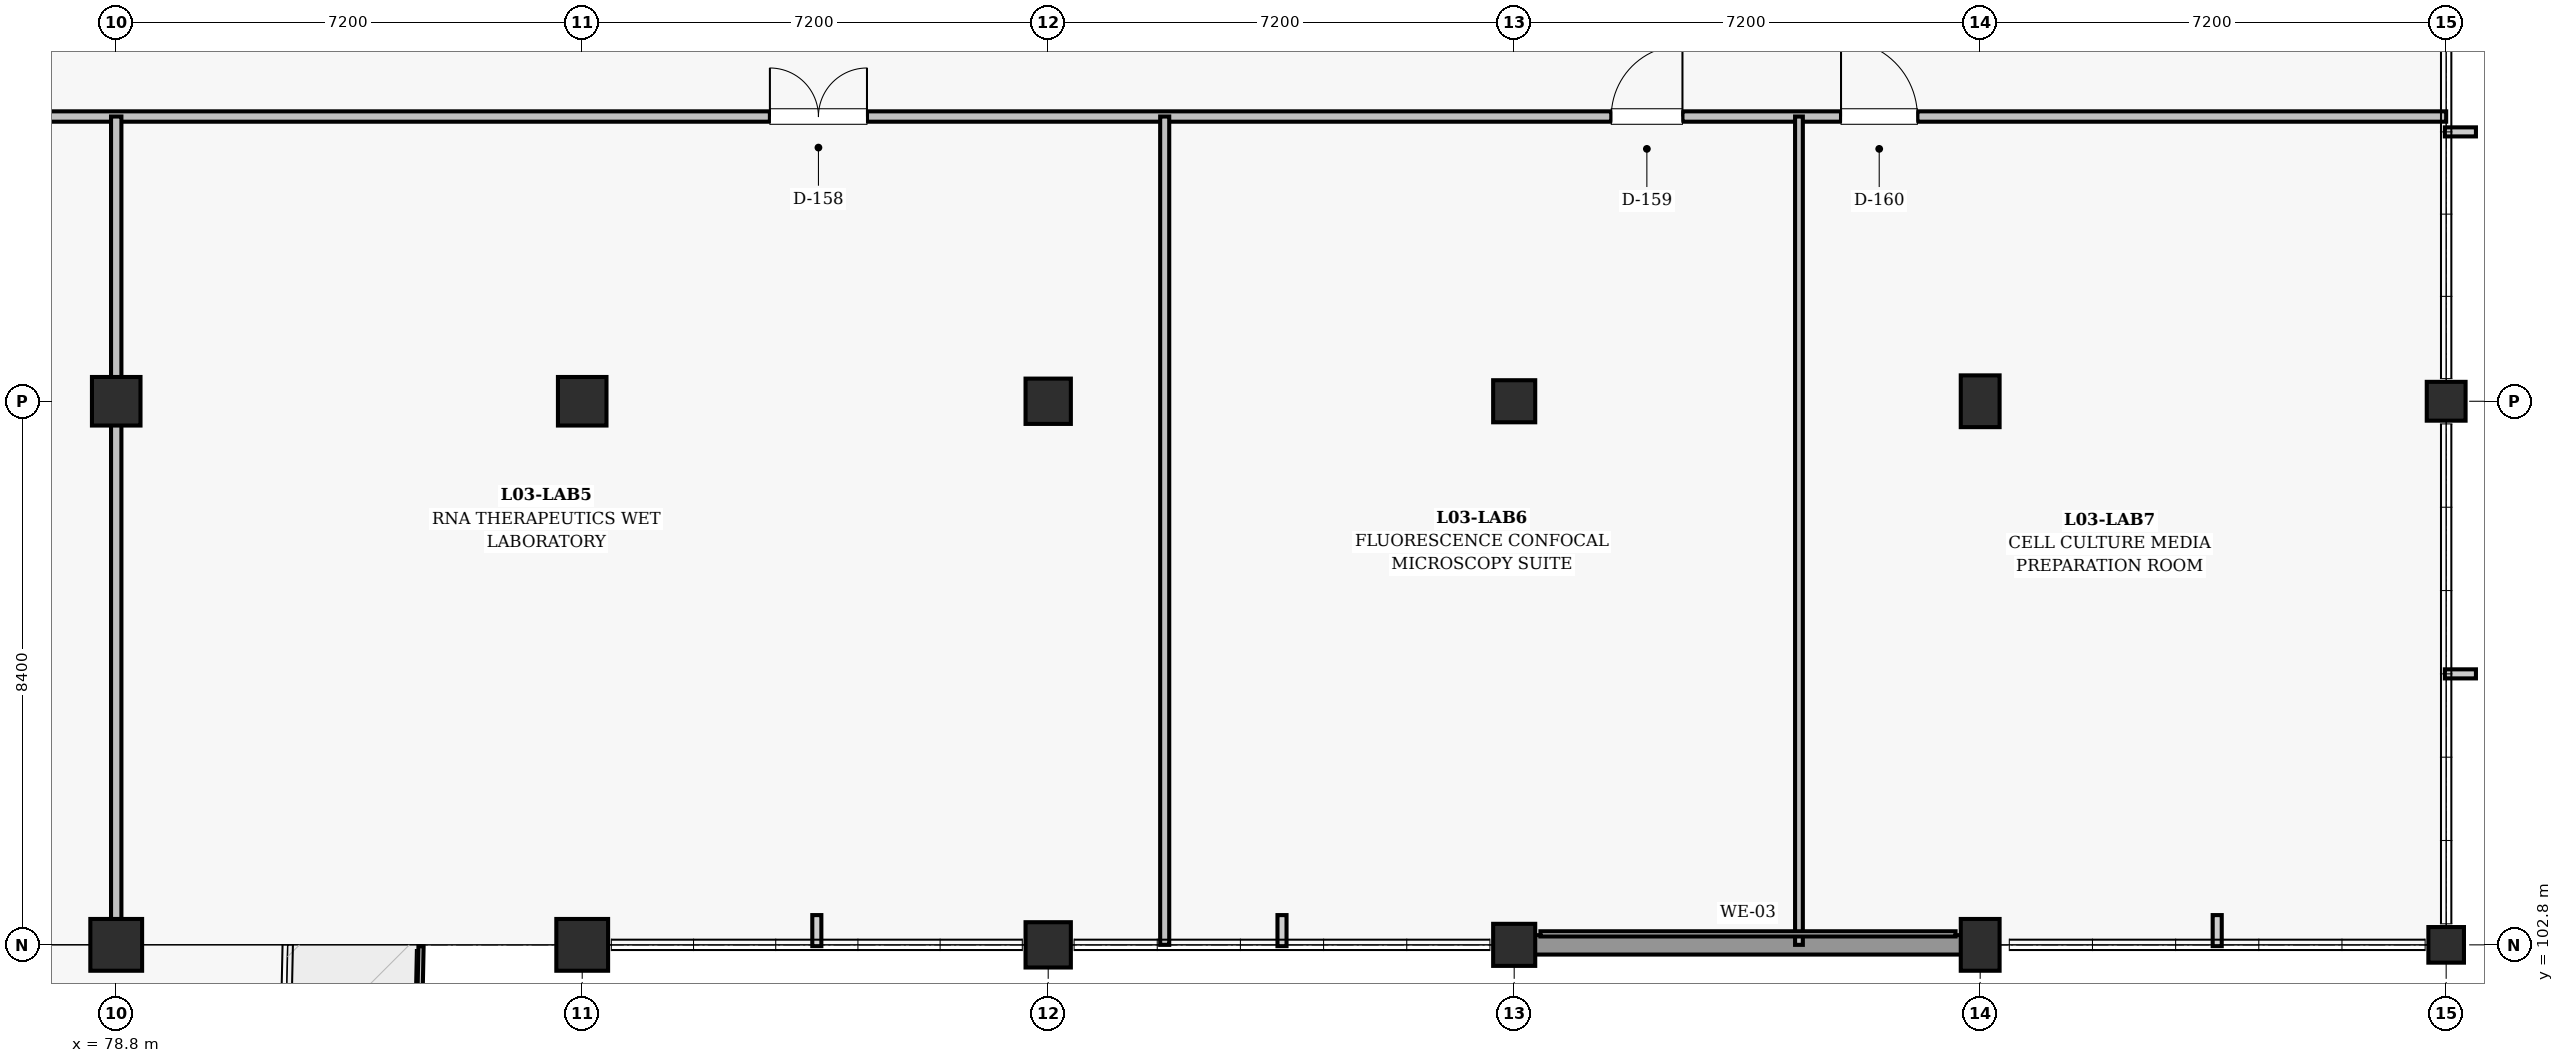
"""IFC4 building model, lengths in metres.
Left out: names, types, materials, properties, quantities, classifications, styles, units other than length and angle.
Written with IfcOpenShell. Run it as: python <this file> out.ifc"""

import sys

from ifc_helpers import new_model, si_unit, direction, frame, frame_2d, origin, origin_2d, place, context, subcontext, project, spatial, rectangle, extrude, element, fill, save


model = new_model("IFC4")
c1 = context("Model", 3, precision=1e-05, world=origin(), true_north=direction((0.0, 1.0)))
c2 = subcontext(c1, "Body", "Model", "MODEL_VIEW")
j1 = project(units=[si_unit("LENGTHUNIT", "METRE"), si_unit("PLANEANGLEUNIT", "RADIAN")], contexts=[c1])
p1 = place(None, origin())
s1 = spatial("IfcSite", under=j1, at=p1, CompositionType="ELEMENT")
p2 = place(p1, origin())
s2 = spatial("IfcBuilding", under=s1, at=p2, CompositionType="ELEMENT")
p3 = place(p2, frame((0.0, 0.0, 14.4)))
s3 = spatial("IfcBuildingStorey", under=s2, at=p3, CompositionType="ELEMENT", Elevation=14.4)
p4 = place(p3, frame((78.8, 102.8, 0.0), z_axis=(0.0, 0.0, 1.0), x_axis=(1.0, 0.0, 0.0)))
e1 = element("IfcColumn", 1, at=p4, inside=s3, PredefinedType="COLUMN", context=c2, shape_type="SweptSolid", body=[
    extrude(rectangle(XDim=0.8, YDim=0.8, at=origin_2d()), origin(), (0.0, 0.0, 1.0), 4.5),
])
p5 = place(p3, frame((78.8, 111.2, 0.0), z_axis=(0.0, 0.0, 1.0), x_axis=(1.0, 0.0, 0.0)))
e2 = element("IfcColumn", 2, at=p5, inside=s3, PredefinedType="COLUMN", context=c2, shape_type="SweptSolid", body=[
    extrude(rectangle(XDim=0.75, YDim=0.75, at=origin_2d()), origin(), (0.0, 0.0, 1.0), 4.5),
])
p6 = place(p3, frame((86.0, 102.8, 0.0), z_axis=(0.0, 0.0, 1.0), x_axis=(1.0, 0.0, 0.0)))
e3 = element("IfcColumn", 3, at=p6, inside=s3, PredefinedType="COLUMN", context=c2, shape_type="SweptSolid", body=[
    extrude(rectangle(XDim=0.8, YDim=0.8, at=origin_2d()), origin(), (0.0, 0.0, 1.0), 4.5),
])
p7 = place(p3, frame((86.0, 111.2, 0.0), z_axis=(0.0, 0.0, 1.0), x_axis=(1.0, 0.0, 0.0)))
e4 = element("IfcColumn", 4, at=p7, inside=s3, PredefinedType="COLUMN", context=c2, shape_type="SweptSolid", body=[
    extrude(rectangle(XDim=0.75, YDim=0.75, at=origin_2d()), origin(), (0.0, 0.0, 1.0), 4.5),
])
for number, where, z_axis, x_axis in (
    (5, (93.2, 102.8, 0.0), (0.0, 0.0, 1.0), (1.0, 0.0, 0.0)),
    (6, (93.2, 111.2, 0.0), (0.0, 0.0, 1.0), (1.0, 0.0, 0.0)),
):
    element("IfcColumn", number, at=place(p3, frame(where, z_axis=z_axis, x_axis=x_axis)), inside=s3, PredefinedType="COLUMN", context=c2, shape_type="SweptSolid", body=[
        extrude(rectangle(XDim=0.7, YDim=0.7, at=origin_2d()), origin(), (0.0, 0.0, 1.0), 4.5),
    ])
for number, where, z_axis, x_axis in (
    (7, (100.4, 102.8, 0.0), (0.0, 0.0, 1.0), (1.0, 0.0, 0.0)),
    (8, (100.4, 111.2, 0.0), (0.0, 0.0, 1.0), (1.0, 0.0, 0.0)),
):
    element("IfcColumn", number, at=place(p3, frame(where, z_axis=z_axis, x_axis=x_axis)), inside=s3, PredefinedType="COLUMN", context=c2, shape_type="SweptSolid", body=[
        extrude(rectangle(XDim=0.65, YDim=0.65, at=origin_2d()), origin(), (0.0, 0.0, 1.0), 4.5),
    ])
for number, where, z_axis, x_axis in (
    (9, (107.6, 102.8, 0.0), (0.0, 0.0, 1.0), (1.0, 0.0, 0.0)),
    (10, (107.6, 111.2, 0.0), (0.0, 0.0, 1.0), (1.0, 0.0, 0.0)),
):
    element("IfcColumn", number, at=place(p3, frame(where, z_axis=z_axis, x_axis=x_axis)), inside=s3, PredefinedType="COLUMN", context=c2, shape_type="SweptSolid", body=[
        extrude(rectangle(XDim=0.6, YDim=0.8, at=origin_2d()), origin(), (0.0, 0.0, 1.0), 4.5),
    ])
p8 = place(p3, frame((114.8, 102.8, 0.0), z_axis=(0.0, 0.0, 1.0), x_axis=(1.0, 0.0, 0.0)))
e11 = element("IfcColumn", 11, at=p8, inside=s3, PredefinedType="COLUMN", context=c2, shape_type="SweptSolid", body=[
    extrude(rectangle(XDim=0.55, YDim=0.55, at=origin_2d()), origin(), (0.0, 0.0, 1.0), 4.5),
])
p9 = place(p3, frame((114.8, 111.2, 0.0), z_axis=(0.0, 0.0, 1.0), x_axis=(1.0, 0.0, 0.0)))
e12 = element("IfcColumn", 12, at=p9, inside=s3, PredefinedType="COLUMN", context=c2, shape_type="SweptSolid", body=[
    extrude(rectangle(XDim=0.6, YDim=0.6, at=origin_2d()), origin(), (0.0, 0.0, 1.0), 4.5),
])
p10 = place(p3, frame((100.705, 102.8, 0.0), z_axis=(0.0, 0.0, 1.0), x_axis=(1.0, 0.0, 0.0)))
e13 = element("IfcWall", 13, at=p10, inside=s3, PredefinedType="SOLIDWALL", context=c2, shape_type="SweptSolid", body=[
    extrude(rectangle(XDim=6.615, YDim=0.3, at=frame_2d((3.308, 0.0))), origin(), (0.0, 0.0, 1.0), 2.955),
])
p11 = place(p3, frame((14.0, 115.6, 0.0), z_axis=(0.0, 0.0, 1.0), x_axis=(1.0, 0.0, 0.0)))
e14 = element("IfcWall", 14, at=p11, inside=s3, PredefinedType="PARTITIONING", context=c2, shape_type="SweptSolid", body=[
    extrude(rectangle(XDim=100.8, YDim=0.16, at=frame_2d((50.4, 0.0))), origin(), (0.0, 0.0, 1.0), 2.96),
])
p12 = place(p11, frame((29.9, 0.0, 0.0)))
e15 = element("IfcOpeningElement", 15, at=p12, cuts=e14, PredefinedType="OPENING", context=c2, shape_type="SweptSolid", body=[
    extrude(rectangle(XDim=1.0, YDim=2.15, at=frame_2d((0.5, 1.075))), frame((0.0, 0.09, 0.0), z_axis=(0.0, -1.0, 0.0), x_axis=(1.0, 0.0, 0.0)), (0.0, 0.0, 1.0), 0.18),
])
p13 = place(p11, frame((6.5, 0.0, 0.0)))
e16 = element("IfcOpeningElement", 16, at=p13, cuts=e14, PredefinedType="OPENING", context=c2, shape_type="SweptSolid", body=[
    extrude(rectangle(XDim=1.5, YDim=2.25, at=frame_2d((0.75, 1.125))), frame((0.0, 0.09, 0.0), z_axis=(0.0, -1.0, 0.0), x_axis=(1.0, 0.0, 0.0)), (0.0, 0.0, 1.0), 0.18),
])
p14 = place(p11, frame((22.9, 0.0, 0.0)))
e17 = element("IfcOpeningElement", 17, at=p14, cuts=e14, PredefinedType="OPENING", context=c2, shape_type="SweptSolid", body=[
    extrude(rectangle(XDim=1.5, YDim=2.25, at=frame_2d((0.75, 1.125))), frame((0.0, 0.09, 0.0), z_axis=(0.0, -1.0, 0.0), x_axis=(1.0, 0.0, 0.0)), (0.0, 0.0, 1.0), 0.18),
])
p15 = place(p11, frame((39.4, 0.0, 0.0)))
e18 = element("IfcOpeningElement", 18, at=p15, cuts=e14, PredefinedType="OPENING", context=c2, shape_type="SweptSolid", body=[
    extrude(rectangle(XDim=1.5, YDim=2.25, at=frame_2d((0.75, 1.125))), frame((0.0, 0.09, 0.0), z_axis=(0.0, -1.0, 0.0), x_axis=(1.0, 0.0, 0.0)), (0.0, 0.0, 1.0), 0.18),
])
p16 = place(p11, frame((55.8, 0.0, 0.0)))
e19 = element("IfcOpeningElement", 19, at=p16, cuts=e14, PredefinedType="OPENING", context=c2, shape_type="SweptSolid", body=[
    extrude(rectangle(XDim=1.5, YDim=2.25, at=frame_2d((0.75, 1.125))), frame((0.0, 0.09, 0.0), z_axis=(0.0, -1.0, 0.0), x_axis=(1.0, 0.0, 0.0)), (0.0, 0.0, 1.0), 0.18),
])
p17 = place(p11, frame((74.9, 0.0, 0.0)))
e20 = element("IfcOpeningElement", 20, at=p17, cuts=e14, PredefinedType="OPENING", context=c2, shape_type="SweptSolid", body=[
    extrude(rectangle(XDim=1.5, YDim=2.25, at=frame_2d((0.75, 1.125))), frame((0.0, 0.09, 0.0), z_axis=(0.0, -1.0, 0.0), x_axis=(1.0, 0.0, 0.0)), (0.0, 0.0, 1.0), 0.18),
])
p18 = place(p11, frame((87.9, 0.0, 0.0)))
e21 = element("IfcOpeningElement", 21, at=p18, cuts=e14, PredefinedType="OPENING", context=c2, shape_type="SweptSolid", body=[
    extrude(rectangle(XDim=1.1, YDim=2.15, at=frame_2d((0.55, 1.075))), frame((0.0, 0.09, 0.0), z_axis=(0.0, -1.0, 0.0), x_axis=(1.0, 0.0, 0.0)), (0.0, 0.0, 1.0), 0.18),
])
p19 = place(p11, frame((91.45, 0.0, 0.0)))
e22 = element("IfcOpeningElement", 22, at=p19, cuts=e14, PredefinedType="OPENING", context=c2, shape_type="SweptSolid", body=[
    extrude(rectangle(XDim=1.18, YDim=2.2, at=frame_2d((0.59, 1.1))), frame((0.0, 0.09, 0.0), z_axis=(0.0, -1.0, 0.0), x_axis=(1.0, 0.0, 0.0)), (0.0, 0.0, 1.0), 0.18),
])
p20 = place(p3, frame((78.8, 102.8, 0.0), z_axis=(0.0, 0.0, 1.0), x_axis=(0.0, 1.0, 0.0)))
e23 = element("IfcWall", 23, at=p20, inside=s3, PredefinedType="PARTITIONING", context=c2, shape_type="SweptSolid", body=[
    extrude(rectangle(XDim=12.8, YDim=0.16, at=frame_2d((6.4, 0.0))), origin(), (0.0, 0.0, 1.0), 2.96),
])
p21 = place(p3, frame((95.0, 102.8, 0.0), z_axis=(0.0, 0.0, 1.0), x_axis=(0.0, 1.0, 0.0)))
e24 = element("IfcWall", 24, at=p21, inside=s3, PredefinedType="PARTITIONING", context=c2, shape_type="SweptSolid", body=[
    extrude(rectangle(XDim=12.8, YDim=0.14, at=frame_2d((6.4, 0.0))), origin(), (0.0, 0.0, 1.0), 3.51),
])
p22 = place(p3, frame((104.8, 102.8, 0.0), z_axis=(0.0, 0.0, 1.0), x_axis=(0.0, 1.0, 0.0)))
e25 = element("IfcWall", 25, at=p22, inside=s3, PredefinedType="PARTITIONING", context=c2, shape_type="SweptSolid", body=[
    extrude(rectangle(XDim=12.8, YDim=0.12, at=frame_2d((6.4, 0.0))), origin(), (0.0, 0.0, 1.0), 3.41),
])
p23 = place(p17, origin())
e26 = element("IfcDoor", 26, at=p23, inside=s3, OperationType="DOUBLE_DOOR_SINGLE_SWING", PredefinedType="DOOR", context=c2, shape_type="SweptSolid", body=[
    extrude(rectangle(XDim=1.5, YDim=2.25, at=frame_2d((0.75, 1.125))), frame((0.0, 0.025, 0.0), z_axis=(0.0, -1.0, 0.0), x_axis=(1.0, 0.0, 0.0)), (0.0, 0.0, 1.0), 0.05),
])
fill(e20, e26)
p24 = place(p18, origin())
e27 = element("IfcDoor", 27, at=p24, inside=s3, OperationType="SINGLE_SWING_RIGHT", PredefinedType="DOOR", context=c2, shape_type="SweptSolid", body=[
    extrude(rectangle(XDim=1.1, YDim=2.15, at=frame_2d((0.55, 1.075))), frame((0.0, 0.025, 0.0), z_axis=(0.0, -1.0, 0.0), x_axis=(1.0, 0.0, 0.0)), (0.0, 0.0, 1.0), 0.05),
])
fill(e21, e27)
p25 = place(p19, origin())
e28 = element("IfcDoor", 28, at=p25, inside=s3, OperationType="SINGLE_SWING_LEFT", PredefinedType="DOOR", context=c2, shape_type="SweptSolid", body=[
    extrude(rectangle(XDim=1.18, YDim=2.2, at=frame_2d((0.59, 1.1))), frame((0.0, 0.025, 0.0), z_axis=(0.0, -1.0, 0.0), x_axis=(1.0, 0.0, 0.0)), (0.0, 0.0, 1.0), 0.05),
])
fill(e22, e28)
save(model, sys.argv[1])
